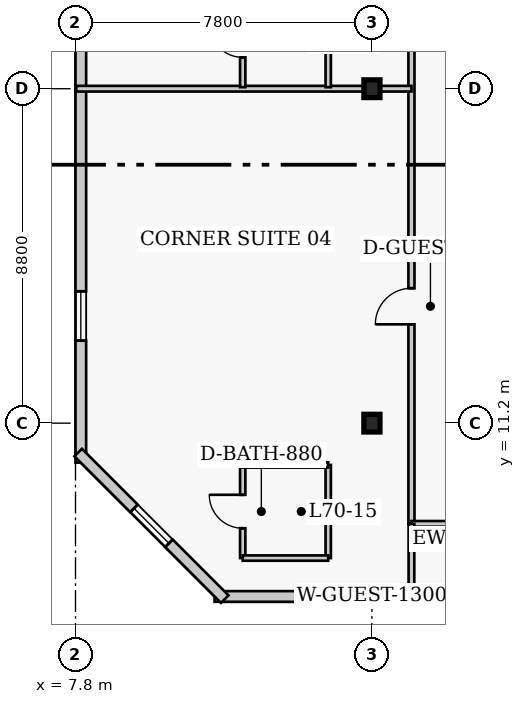
"""IFC4 building model, lengths in metres.
Left out: names, types, materials, properties, quantities, classifications, styles, units other than length and angle.
Written with IfcOpenShell. Run it as: python <this file> out.ifc"""

import sys

from ifc_helpers import new_model, si_unit, direction, frame, frame_2d, origin, origin_2d, place, context, subcontext, project, spatial, rectangle, i_section, extrude, element, fill, save


model = new_model("IFC4")
c1 = context("Model", 3, precision=1e-05, world=origin(), true_north=direction((0.0, 1.0)))
c2 = subcontext(c1, "Body", "Model", "MODEL_VIEW")
j1 = project(units=[si_unit("LENGTHUNIT", "METRE"), si_unit("PLANEANGLEUNIT", "RADIAN")], contexts=[c1])
p1 = place(None, origin())
s1 = spatial("IfcSite", under=j1, at=p1, CompositionType="ELEMENT")
p2 = place(p1, origin())
s2 = spatial("IfcBuilding", under=s1, at=p2, CompositionType="ELEMENT")
p3 = place(p2, frame((0.0, 0.0, 281.4)))
s3 = spatial("IfcBuildingStorey", under=s2, at=p3, CompositionType="ELEMENT", Elevation=281.4)
for number, where, z_axis, x_axis in (
    (1, (15.6, 11.2, 0.0), (0.0, 0.0, 1.0), (1.0, 0.0, 0.0)),
    (2, (15.6, 20.0, 0.0), (0.0, 0.0, 1.0), (1.0, 0.0, 0.0)),
):
    element("IfcColumn", number, at=place(p3, frame(where, z_axis=z_axis, x_axis=x_axis)), inside=s3, PredefinedType="COLUMN", context=c2, shape_type="SweptSolid", body=[
        extrude(i_section(OverallWidth=0.422, OverallDepth=0.465, WebThickness=0.045, FlangeThickness=0.073, FilletRadius=0.017, at=origin_2d()), origin(), (0.0, 0.0, 1.0), 4.0),
    ])
p4 = place(p3, frame((11.46, 6.64, 0.0), z_axis=(0.0, 0.0, 1.0), x_axis=(1.0, 0.0, 0.0)))
e3 = element("IfcWall", 3, at=p4, inside=s3, PredefinedType="SOLIDWALL", context=c2, shape_type="SweptSolid", body=[
    extrude(rectangle(XDim=24.83, YDim=0.28, at=frame_2d((12.415, 0.0))), origin(), (0.0, 0.0, 1.0), 3.76),
])
p5 = place(p4, frame((15.14, 0.0, 0.0)))
e4 = element("IfcOpeningElement", 4, at=p5, cuts=e3, PredefinedType="OPENING", context=c2, shape_type="SweptSolid", body=[
    extrude(rectangle(XDim=1.4, YDim=2.15, at=frame_2d((0.7, 1.075))), frame((0.0, 0.15, 0.0), z_axis=(0.0, -1.0, 0.0), x_axis=(1.0, 0.0, 0.0)), (0.0, 0.0, 1.0), 0.3),
])
p6 = place(p4, frame((3.488, 0.0, 0.85)))
e5 = element("IfcOpeningElement", 5, at=p6, cuts=e3, PredefinedType="OPENING", context=c2, shape_type="SweptSolid", body=[
    extrude(rectangle(XDim=1.3, YDim=1.7, at=frame_2d((0.65, 0.85))), frame((0.0, 0.15, 0.0), z_axis=(0.0, -1.0, 0.0), x_axis=(1.0, 0.0, 0.0)), (0.0, 0.0, 1.0), 0.3),
])
p7 = place(p4, frame((12.915, 0.0, 0.85)))
e6 = element("IfcOpeningElement", 6, at=p7, cuts=e3, PredefinedType="OPENING", context=c2, shape_type="SweptSolid", body=[
    extrude(rectangle(XDim=1.3, YDim=1.7, at=frame_2d((0.65, 0.85))), frame((0.0, 0.15, 0.0), z_axis=(0.0, -1.0, 0.0), x_axis=(1.0, 0.0, 0.0)), (0.0, 0.0, 1.0), 0.3),
])
p8 = place(p4, frame((20.692, 0.0, 0.85)))
e7 = element("IfcOpeningElement", 7, at=p8, cuts=e3, PredefinedType="OPENING", context=c2, shape_type="SweptSolid", body=[
    extrude(rectangle(XDim=1.3, YDim=1.7, at=frame_2d((0.65, 0.85))), frame((0.0, 0.15, 0.0), z_axis=(0.0, -1.0, 0.0), x_axis=(1.0, 0.0, 0.0)), (0.0, 0.0, 1.0), 0.3),
])
p9 = place(p4, frame((9.275, 0.0, 0.85)))
e8 = element("IfcOpeningElement", 8, at=p9, cuts=e3, PredefinedType="OPENING", context=c2, shape_type="SweptSolid", body=[
    extrude(rectangle(XDim=1.3, YDim=1.7, at=frame_2d((0.65, 0.85))), frame((0.0, 0.15, 0.0), z_axis=(0.0, -1.0, 0.0), x_axis=(1.0, 0.0, 0.0)), (0.0, 0.0, 1.0), 0.3),
])
p10 = place(p3, frame((7.94, 41.04, 0.0), z_axis=(0.0, 0.0, 1.0), x_axis=(0.0, -1.0, 0.0)))
e9 = element("IfcWall", 9, at=p10, inside=s3, PredefinedType="SOLIDWALL", context=c2, shape_type="SweptSolid", body=[
    extrude(rectangle(XDim=30.88, YDim=0.28, at=frame_2d((15.44, 0.0))), origin(), (0.0, 0.0, 1.0), 3.76),
])
p11 = place(p10, frame((2.56, 0.0, 0.85)))
e10 = element("IfcOpeningElement", 10, at=p11, cuts=e9, PredefinedType="OPENING", context=c2, shape_type="SweptSolid", body=[
    extrude(rectangle(XDim=1.3, YDim=1.7, at=frame_2d((0.65, 0.85))), frame((0.0, 0.15, 0.0), z_axis=(0.0, -1.0, 0.0), x_axis=(1.0, 0.0, 0.0)), (0.0, 0.0, 1.0), 0.3),
])
p12 = place(p10, frame((10.28, 0.0, 0.85)))
e11 = element("IfcOpeningElement", 11, at=p12, cuts=e9, PredefinedType="OPENING", context=c2, shape_type="SweptSolid", body=[
    extrude(rectangle(XDim=1.3, YDim=1.7, at=frame_2d((0.65, 0.85))), frame((0.0, 0.15, 0.0), z_axis=(0.0, -1.0, 0.0), x_axis=(1.0, 0.0, 0.0)), (0.0, 0.0, 1.0), 0.3),
])
p13 = place(p10, frame((18.65, 0.0, 0.85)))
e12 = element("IfcOpeningElement", 12, at=p13, cuts=e9, PredefinedType="OPENING", context=c2, shape_type="SweptSolid", body=[
    extrude(rectangle(XDim=1.3, YDim=1.7, at=frame_2d((0.65, 0.85))), frame((0.0, 0.15, 0.0), z_axis=(0.0, -1.0, 0.0), x_axis=(1.0, 0.0, 0.0)), (0.0, 0.0, 1.0), 0.3),
])
p14 = place(p10, frame((26.37, 0.0, 0.85)))
e13 = element("IfcOpeningElement", 13, at=p14, cuts=e9, PredefinedType="OPENING", context=c2, shape_type="SweptSolid", body=[
    extrude(rectangle(XDim=1.3, YDim=1.7, at=frame_2d((0.65, 0.85))), frame((0.0, 0.15, 0.0), z_axis=(0.0, -1.0, 0.0), x_axis=(1.0, 0.0, 0.0)), (0.0, 0.0, 1.0), 0.3),
])
p15 = place(p3, frame((7.871, 10.427, 0.0), z_axis=(0.0, 0.0, 1.0), x_axis=(0.707129162587, -0.707084399077, 0.0)))
e14 = element("IfcWall", 14, at=p15, inside=s3, PredefinedType="SOLIDWALL", context=c2, shape_type="SweptSolid", body=[
    extrude(rectangle(XDim=5.454, YDim=0.28, at=frame_2d((2.727, 0.0))), origin(), (0.0, 0.0, 1.0), 3.76),
])
p16 = place(p15, frame((2.077, 0.0, 0.85)))
e15 = element("IfcOpeningElement", 15, at=p16, cuts=e14, PredefinedType="OPENING", context=c2, shape_type="SweptSolid", body=[
    extrude(rectangle(XDim=1.3, YDim=1.7, at=frame_2d((0.65, 0.85))), frame((0.0, 0.15, 0.0), z_axis=(0.0, -1.0, 0.0), x_axis=(1.0, 0.0, 0.0)), (0.0, 0.0, 1.0), 0.3),
])
p17 = place(p3, frame((16.64, 8.55, 0.0), z_axis=(0.0, 0.0, 1.0), x_axis=(0.0, 1.0, 0.0)))
e16 = element("IfcWall", 16, at=p17, inside=s3, PredefinedType="PARTITIONING", context=c2, shape_type="SweptSolid", body=[
    extrude(rectangle(XDim=32.1, YDim=0.16, at=frame_2d((16.05, 0.0))), origin(), (0.0, 0.0, 1.0), 3.76),
])
p18 = place(p17, frame((5.25, 0.0, 0.0)))
e17 = element("IfcOpeningElement", 17, at=p18, cuts=e16, PredefinedType="OPENING", context=c2, shape_type="SweptSolid", body=[
    extrude(rectangle(XDim=0.95, YDim=2.1, at=frame_2d((0.475, 1.05))), frame((0.0, 0.09, 0.0), z_axis=(0.0, -1.0, 0.0), x_axis=(1.0, 0.0, 0.0)), (0.0, 0.0, 1.0), 0.18),
])
p19 = place(p17, frame((15.375, 0.0, 0.0)))
e18 = element("IfcOpeningElement", 18, at=p19, cuts=e16, PredefinedType="OPENING", context=c2, shape_type="SweptSolid", body=[
    extrude(rectangle(XDim=0.95, YDim=2.1, at=frame_2d((0.475, 1.05))), frame((0.0, 0.09, 0.0), z_axis=(0.0, -1.0, 0.0), x_axis=(1.0, 0.0, 0.0)), (0.0, 0.0, 1.0), 0.18),
])
p20 = place(p17, frame((23.775, 0.0, 0.0)))
e19 = element("IfcOpeningElement", 19, at=p20, cuts=e16, PredefinedType="OPENING", context=c2, shape_type="SweptSolid", body=[
    extrude(rectangle(XDim=0.95, YDim=2.1, at=frame_2d((0.475, 1.05))), frame((0.0, 0.09, 0.0), z_axis=(0.0, -1.0, 0.0), x_axis=(1.0, 0.0, 0.0)), (0.0, 0.0, 1.0), 0.18),
])
p21 = place(p17, frame((30.66, 0.0, 0.0)))
e20 = element("IfcOpeningElement", 20, at=p21, cuts=e16, PredefinedType="OPENING", context=c2, shape_type="SweptSolid", body=[
    extrude(rectangle(XDim=1.0, YDim=2.15, at=frame_2d((0.5, 1.075))), frame((0.0, 0.09, 0.0), z_axis=(0.0, -1.0, 0.0), x_axis=(1.0, 0.0, 0.0)), (0.0, 0.0, 1.0), 0.18),
])
p22 = place(p3, frame((16.64, 8.55, 0.0), z_axis=(0.0, 0.0, 1.0), x_axis=(1.0, 0.0, 0.0)))
e21 = element("IfcWall", 21, at=p22, inside=s3, PredefinedType="PARTITIONING", context=c2, shape_type="SweptSolid", body=[
    extrude(rectangle(XDim=2.22, YDim=0.15, at=frame_2d((1.11, 0.0))), origin(), (0.0, 0.0, 1.0), 3.76),
])
p23 = place(p3, frame((16.64, 6.52, 0.0), z_axis=(0.0, 0.0, 1.0), x_axis=(0.0, 1.0, 0.0)))
e22 = element("IfcWall", 22, at=p23, inside=s3, PredefinedType="PARTITIONING", context=c2, shape_type="SweptSolid", body=[
    extrude(rectangle(XDim=2.03, YDim=0.15, at=frame_2d((1.015, 0.0))), origin(), (0.0, 0.0, 1.0), 3.76),
])
p24 = place(p3, frame((12.2, 7.65, 0.0), z_axis=(0.0, 0.0, 1.0), x_axis=(0.0, 1.0, 0.0)))
e23 = element("IfcWall", 23, at=p24, inside=s3, PredefinedType="PLUMBINGWALL", context=c2, shape_type="SweptSolid", body=[
    extrude(rectangle(XDim=2.45, YDim=0.14, at=frame_2d((1.225, 0.0))), origin(), (0.0, 0.0, 1.0), 3.76),
])
p25 = place(p24, frame((0.785, 0.0, 0.0)))
e24 = element("IfcOpeningElement", 24, at=p25, cuts=e23, PredefinedType="OPENING", context=c2, shape_type="SweptSolid", body=[
    extrude(rectangle(XDim=0.88, YDim=2.05, at=frame_2d((0.44, 1.025))), frame((0.0, 0.08, 0.0), z_axis=(0.0, -1.0, 0.0), x_axis=(1.0, 0.0, 0.0)), (0.0, 0.0, 1.0), 0.16),
])
p26 = place(p3, frame((14.45, 7.65, 0.0), z_axis=(0.0, 0.0, 1.0), x_axis=(0.0, 1.0, 0.0)))
e25 = element("IfcWall", 25, at=p26, inside=s3, PredefinedType="PLUMBINGWALL", context=c2, shape_type="SweptSolid", body=[
    extrude(rectangle(XDim=2.45, YDim=0.14, at=frame_2d((1.225, 0.0))), origin(), (0.0, 0.0, 1.0), 3.76),
])
for number, where, z_axis, x_axis in (
    (26, (12.2, 7.65, 0.0), (0.0, 0.0, 1.0), (1.0, 0.0, 0.0)),
    (27, (12.2, 10.1, 0.0), (0.0, 0.0, 1.0), (1.0, 0.0, 0.0)),
):
    element("IfcWall", number, at=place(p3, frame(where, z_axis=z_axis, x_axis=x_axis)), inside=s3, PredefinedType="PLUMBINGWALL", context=c2, shape_type="SweptSolid", body=[
        extrude(rectangle(XDim=2.25, YDim=0.14, at=frame_2d((1.125, 0.0))), origin(), (0.0, 0.0, 1.0), 3.76),
    ])
p27 = place(p3, frame((7.82, 20.0, 0.0), z_axis=(0.0, 0.0, 1.0), x_axis=(1.0, 0.0, 0.0)))
e28 = element("IfcWall", 28, at=p27, inside=s3, PredefinedType="PARTITIONING", context=c2, shape_type="SweptSolid", body=[
    extrude(rectangle(XDim=8.82, YDim=0.15, at=frame_2d((4.41, 0.0))), origin(), (0.0, 0.0, 1.0), 3.064),
])
p28 = place(p3, frame((12.2, 20.04, 0.0), z_axis=(0.0, 0.0, 1.0), x_axis=(0.0, 1.0, 0.0)))
e29 = element("IfcWall", 29, at=p28, inside=s3, PredefinedType="PLUMBINGWALL", context=c2, shape_type="SweptSolid", body=[
    extrude(rectangle(XDim=2.45, YDim=0.14, at=frame_2d((1.225, 0.0))), origin(), (0.0, 0.0, 1.0), 3.76),
])
p29 = place(p28, frame((0.785, 0.0, 0.0)))
e30 = element("IfcOpeningElement", 30, at=p29, cuts=e29, PredefinedType="OPENING", context=c2, shape_type="SweptSolid", body=[
    extrude(rectangle(XDim=0.88, YDim=2.05, at=frame_2d((0.44, 1.025))), frame((0.0, 0.08, 0.0), z_axis=(0.0, -1.0, 0.0), x_axis=(1.0, 0.0, 0.0)), (0.0, 0.0, 1.0), 0.16),
])
p30 = place(p3, frame((14.45, 20.04, 0.0), z_axis=(0.0, 0.0, 1.0), x_axis=(0.0, 1.0, 0.0)))
e31 = element("IfcWall", 31, at=p30, inside=s3, PredefinedType="PLUMBINGWALL", context=c2, shape_type="SweptSolid", body=[
    extrude(rectangle(XDim=2.45, YDim=0.14, at=frame_2d((1.225, 0.0))), origin(), (0.0, 0.0, 1.0), 3.76),
])
p31 = place(p6, origin())
e32 = element("IfcWindow", 32, at=p31, inside=s3, PartitioningType="SINGLE_PANEL", PredefinedType="WINDOW", context=c2, shape_type="SweptSolid", body=[
    extrude(rectangle(XDim=1.3, YDim=1.7, at=frame_2d((0.65, 0.85))), frame((0.0, 0.03, 0.0), z_axis=(0.0, -1.0, 0.0), x_axis=(1.0, 0.0, 0.0)), (0.0, 0.0, 1.0), 0.06),
])
fill(e5, e32)
p32 = place(p14, origin())
e33 = element("IfcWindow", 33, at=p32, inside=s3, PartitioningType="SINGLE_PANEL", PredefinedType="WINDOW", context=c2, shape_type="SweptSolid", body=[
    extrude(rectangle(XDim=1.3, YDim=1.7, at=frame_2d((0.65, 0.85))), frame((0.0, 0.03, 0.0), z_axis=(0.0, -1.0, 0.0), x_axis=(1.0, 0.0, 0.0)), (0.0, 0.0, 1.0), 0.06),
])
fill(e13, e33)
p33 = place(p16, origin())
e34 = element("IfcWindow", 34, at=p33, inside=s3, PartitioningType="SINGLE_PANEL", PredefinedType="WINDOW", context=c2, shape_type="SweptSolid", body=[
    extrude(rectangle(XDim=1.3, YDim=1.7, at=frame_2d((0.65, 0.85))), frame((0.0, 0.03, 0.0), z_axis=(0.0, -1.0, 0.0), x_axis=(1.0, 0.0, 0.0)), (0.0, 0.0, 1.0), 0.06),
])
fill(e15, e34)
p34 = place(p25, origin())
e35 = element("IfcDoor", 35, at=p34, inside=s3, OperationType="SINGLE_SWING_RIGHT", PredefinedType="DOOR", context=c2, shape_type="SweptSolid", body=[
    extrude(rectangle(XDim=0.88, YDim=2.05, at=frame_2d((0.44, 1.025))), frame((0.0, 0.025, 0.0), z_axis=(0.0, -1.0, 0.0), x_axis=(1.0, 0.0, 0.0)), (0.0, 0.0, 1.0), 0.05),
])
fill(e24, e35)
p35 = place(p18, origin())
e36 = element("IfcDoor", 36, at=p35, inside=s3, OperationType="SINGLE_SWING_LEFT", PredefinedType="DOOR", context=c2, shape_type="SweptSolid", body=[
    extrude(rectangle(XDim=0.95, YDim=2.1, at=frame_2d((0.475, 1.05))), frame((0.0, 0.025, 0.0), z_axis=(0.0, -1.0, 0.0), x_axis=(1.0, 0.0, 0.0)), (0.0, 0.0, 1.0), 0.05),
])
fill(e17, e36)
p36 = place(p29, origin())
e37 = element("IfcDoor", 37, at=p36, inside=s3, OperationType="SINGLE_SWING_RIGHT", PredefinedType="DOOR", context=c2, shape_type="SweptSolid", body=[
    extrude(rectangle(XDim=0.88, YDim=2.05, at=frame_2d((0.44, 1.025))), frame((0.0, 0.025, 0.0), z_axis=(0.0, -1.0, 0.0), x_axis=(1.0, 0.0, 0.0)), (0.0, 0.0, 1.0), 0.05),
])
fill(e30, e37)
save(model, sys.argv[1])
